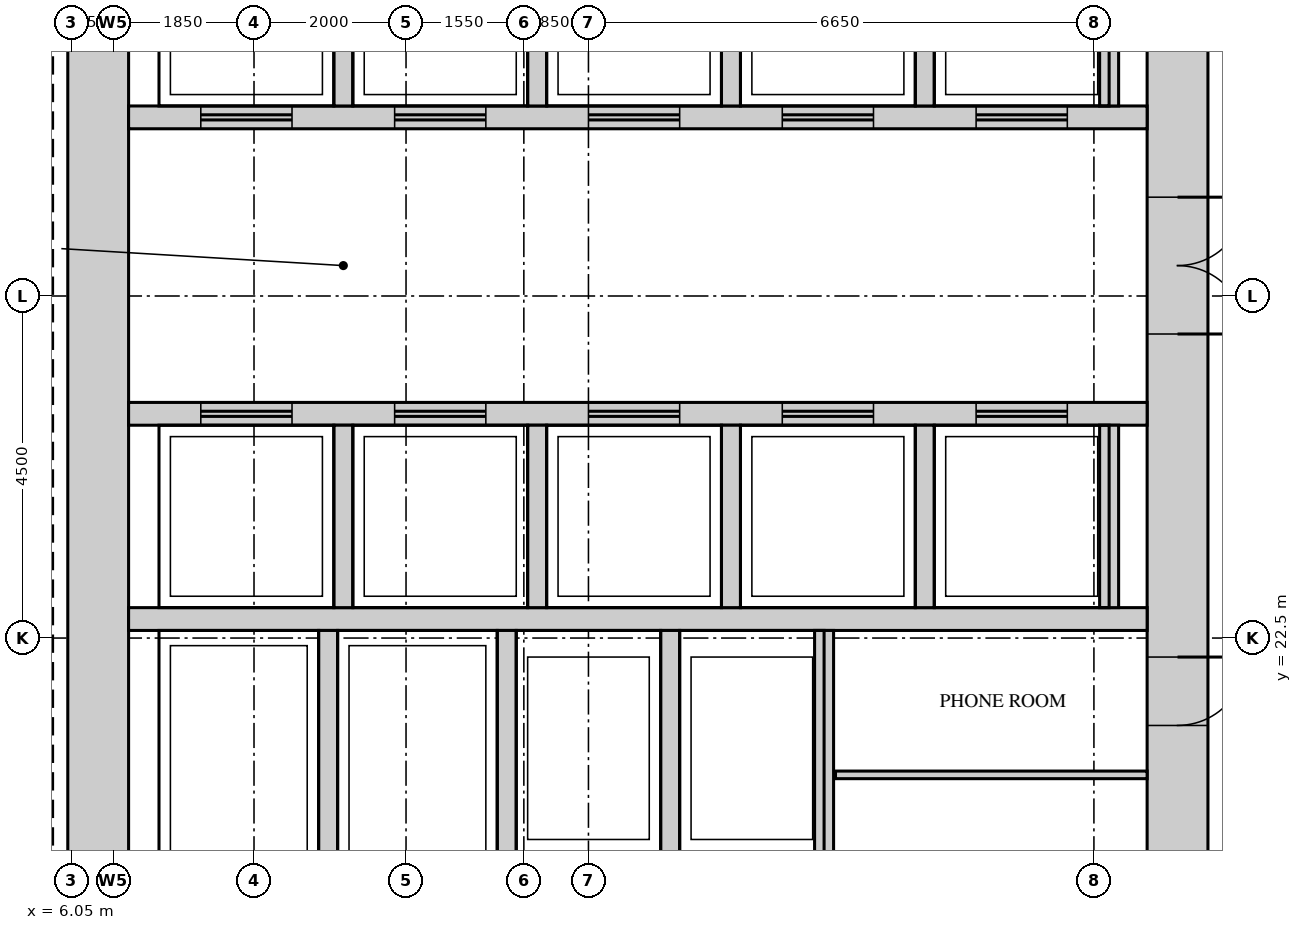
"""IFC4 building model, lengths in metres.
Left out: names, types, materials, properties, quantities, classifications, styles, units other than length and angle.
Written with IfcOpenShell. Run it as: python <this file> out.ifc"""

import sys

from ifc_helpers import new_model, si_unit, direction, frame, frame_2d, origin, place, context, subcontext, project, spatial, rectangle, extrude, source, transform, mapped, element, fill, save


model = new_model("IFC4")
c1 = context("Model", 3, precision=1e-05, world=origin(), true_north=direction((0.0, 1.0)))
c2 = subcontext(c1, "Body", "Model", "MODEL_VIEW")
j1 = project(units=[si_unit("LENGTHUNIT", "METRE"), si_unit("PLANEANGLEUNIT", "RADIAN")], contexts=[c1])
p1 = place(None, origin())
s1 = spatial("IfcSite", under=j1, at=p1, CompositionType="ELEMENT")
p2 = place(p1, origin())
s2 = spatial("IfcBuilding", under=s1, at=p2, CompositionType="ELEMENT")
p3 = place(p2, frame((0.0, 0.0, 172.7)))
s3 = spatial("IfcBuildingStorey", under=s2, at=p3, CompositionType="ELEMENT", Elevation=172.7)
m1 = source(origin(), c2, "Body", "SweptSolid", [
    extrude(rectangle(XDim=22.4, YDim=0.8, at=frame_2d((11.2, 0.0))), origin(), (0.0, 0.0, 1.0), 3.75),
])
p4 = place(p3, frame((20.6, 15.8, 0.0), z_axis=(0.0, 0.0, 1.0), x_axis=(0.0, 1.0, 0.0)))
e1 = element("IfcWall", 1, at=p4, inside=s3, PredefinedType="SHEAR", context=c2, shape_type="MappedRepresentation", body=[
    mapped(m1, transform((0.0, 0.0, 0.0))),
])
m2 = source(origin(), c2, "Body", "SweptSolid", [
    extrude(rectangle(XDim=1.8, YDim=2.1, at=frame_2d((0.9, 1.05))), frame((0.0, 0.41, 0.0), z_axis=(0.0, -1.0, 0.0), x_axis=(1.0, 0.0, 0.0)), (0.0, 0.0, 1.0), 0.82),
])
p5 = place(p4, frame((10.7, 0.0, 0.0)))
e2 = element("IfcOpeningElement", 2, at=p5, cuts=e1, PredefinedType="OPENING", context=c2, shape_type="MappedRepresentation", body=[
    mapped(m2, transform((0.0, 0.0, 0.0))),
])
m3 = source(origin(), c2, "Body", "SweptSolid", [
    extrude(rectangle(XDim=0.9, YDim=2.1, at=frame_2d((0.45, 1.05))), frame((0.0, 0.41, 0.0), z_axis=(0.0, -1.0, 0.0), x_axis=(1.0, 0.0, 0.0)), (0.0, 0.0, 1.0), 0.82),
])
p6 = place(p4, frame((0.35, 0.0, 0.0)))
e3 = element("IfcOpeningElement", 3, at=p6, cuts=e1, PredefinedType="OPENING", context=c2, shape_type="MappedRepresentation", body=[
    mapped(m3, transform((0.0, 0.0, 0.0))),
])
p7 = place(p4, frame((2.8, 0.0, 0.0)))
e4 = element("IfcOpeningElement", 4, at=p7, cuts=e1, PredefinedType="OPENING", context=c2, shape_type="MappedRepresentation", body=[
    mapped(m3, transform((0.0, 0.0, 0.0))),
])
p8 = place(p4, frame((5.55, 0.0, 0.0)))
e5 = element("IfcOpeningElement", 5, at=p8, cuts=e1, PredefinedType="OPENING", context=c2, shape_type="MappedRepresentation", body=[
    mapped(m3, transform((0.0, 0.0, 0.0))),
])
p9 = place(p3, frame((6.4, 15.8, 0.0), z_axis=(0.0, 0.0, 1.0), x_axis=(0.0, 1.0, 0.0)))
e6 = element("IfcWall", 6, at=p9, inside=s3, PredefinedType="SHEAR", context=c2, shape_type="MappedRepresentation", body=[
    mapped(m1, transform((0.0, 0.0, 0.0))),
])
m4 = source(origin(), c2, "Body", "SweptSolid", [
    extrude(rectangle(XDim=13.4, YDim=0.3, at=frame_2d((6.7, 0.0))), origin(), (0.0, 0.0, 1.0), 3.75),
])
p10 = place(p3, frame((6.8, 22.75, 0.0), z_axis=(0.0, 0.0, 1.0), x_axis=(1.0, 0.0, 0.0)))
e7 = element("IfcWall", 7, at=p10, inside=s3, PredefinedType="STANDARD", context=c2, shape_type="MappedRepresentation", body=[
    mapped(m4, transform((0.0, 0.0, 0.0))),
])
p11 = place(p3, frame((6.8, 29.35, 0.0), z_axis=(0.0, 0.0, 1.0), x_axis=(1.0, 0.0, 0.0)))
e8 = element("IfcWall", 8, at=p11, inside=s3, PredefinedType="STANDARD", context=c2, shape_type="MappedRepresentation", body=[
    mapped(m4, transform((0.0, 0.0, 0.0))),
])
m5 = source(origin(), c2, "Body", "SweptSolid", [
    extrude(rectangle(XDim=1.2, YDim=2.1, at=frame_2d((0.6, 1.05))), frame((0.0, 0.16, 0.0), z_axis=(0.0, -1.0, 0.0), x_axis=(1.0, 0.0, 0.0)), (0.0, 0.0, 1.0), 0.32),
])
p12 = place(p11, frame((0.95, 0.0, 0.0)))
e9 = element("IfcOpeningElement", 9, at=p12, cuts=e8, PredefinedType="OPENING", context=c2, shape_type="MappedRepresentation", body=[
    mapped(m5, transform((0.0, 0.0, 0.0))),
])
p13 = place(p11, frame((3.5, 0.0, 0.0)))
e10 = element("IfcOpeningElement", 10, at=p13, cuts=e8, PredefinedType="OPENING", context=c2, shape_type="MappedRepresentation", body=[
    mapped(m5, transform((0.0, 0.0, 0.0))),
])
p14 = place(p11, frame((6.05, 0.0, 0.0)))
e11 = element("IfcOpeningElement", 11, at=p14, cuts=e8, PredefinedType="OPENING", context=c2, shape_type="MappedRepresentation", body=[
    mapped(m5, transform((0.0, 0.0, 0.0))),
])
p15 = place(p11, frame((8.6, 0.0, 0.0)))
e12 = element("IfcOpeningElement", 12, at=p15, cuts=e8, PredefinedType="OPENING", context=c2, shape_type="MappedRepresentation", body=[
    mapped(m5, transform((0.0, 0.0, 0.0))),
])
p16 = place(p11, frame((11.15, 0.0, 0.0)))
e13 = element("IfcOpeningElement", 13, at=p16, cuts=e8, PredefinedType="OPENING", context=c2, shape_type="MappedRepresentation", body=[
    mapped(m5, transform((0.0, 0.0, 0.0))),
])
p17 = place(p3, frame((6.8, 25.45, 0.0), z_axis=(0.0, 0.0, 1.0), x_axis=(1.0, 0.0, 0.0)))
e14 = element("IfcWall", 14, at=p17, inside=s3, PredefinedType="STANDARD", context=c2, shape_type="MappedRepresentation", body=[
    mapped(m4, transform((0.0, 0.0, 0.0))),
])
p18 = place(p17, frame((0.95, 0.0, 0.0)))
e15 = element("IfcOpeningElement", 15, at=p18, cuts=e14, PredefinedType="OPENING", context=c2, shape_type="MappedRepresentation", body=[
    mapped(m5, transform((0.0, 0.0, 0.0))),
])
p19 = place(p17, frame((3.5, 0.0, 0.0)))
e16 = element("IfcOpeningElement", 16, at=p19, cuts=e14, PredefinedType="OPENING", context=c2, shape_type="MappedRepresentation", body=[
    mapped(m5, transform((0.0, 0.0, 0.0))),
])
p20 = place(p17, frame((6.05, 0.0, 0.0)))
e17 = element("IfcOpeningElement", 17, at=p20, cuts=e14, PredefinedType="OPENING", context=c2, shape_type="MappedRepresentation", body=[
    mapped(m5, transform((0.0, 0.0, 0.0))),
])
p21 = place(p17, frame((8.6, 0.0, 0.0)))
e18 = element("IfcOpeningElement", 18, at=p21, cuts=e14, PredefinedType="OPENING", context=c2, shape_type="MappedRepresentation", body=[
    mapped(m5, transform((0.0, 0.0, 0.0))),
])
p22 = place(p17, frame((11.15, 0.0, 0.0)))
e19 = element("IfcOpeningElement", 19, at=p22, cuts=e14, PredefinedType="OPENING", context=c2, shape_type="MappedRepresentation", body=[
    mapped(m5, transform((0.0, 0.0, 0.0))),
])
m6 = source(origin(), c2, "Body", "SweptSolid", [
    extrude(rectangle(XDim=3.1, YDim=0.25, at=frame_2d((1.55, 0.0))), origin(), (0.0, 0.0, 1.0), 3.75),
])
for number, where, z_axis, x_axis in (
    (20, (9.425, 19.5, 0.0), (0.0, 0.0, 1.0), (0.0, 1.0, 0.0)),
    (21, (11.775, 19.5, 0.0), (0.0, 0.0, 1.0), (0.0, 1.0, 0.0)),
    (22, (13.925, 19.5, 0.0), (0.0, 0.0, 1.0), (0.0, 1.0, 0.0)),
    (23, (15.95, 19.5, 0.0), (0.0, 0.0, 1.0), (0.0, 1.0, 0.0)),
):
    element("IfcWall", number, at=place(p3, frame(where, z_axis=z_axis, x_axis=x_axis)), inside=s3, PredefinedType="STANDARD", context=c2, shape_type="MappedRepresentation", body=[
        mapped(m6, transform((0.0, 0.0, 0.0))),
    ])
m7 = source(origin(), c2, "Body", "SweptSolid", [
    extrude(rectangle(XDim=2.4, YDim=0.25, at=frame_2d((1.2, 0.0))), origin(), (0.0, 0.0, 1.0), 3.75),
])
for number, where, z_axis, x_axis in (
    (24, (17.275, 29.5, 0.0), (0.0, 0.0, 1.0), (0.0, 1.0, 0.0)),
    (25, (19.7, 29.5, 0.0), (0.0, 0.0, 1.0), (0.0, 1.0, 0.0)),
    (26, (9.625, 29.5, 0.0), (0.0, 0.0, 1.0), (0.0, 1.0, 0.0)),
    (27, (12.175, 29.5, 0.0), (0.0, 0.0, 1.0), (0.0, 1.0, 0.0)),
    (28, (14.725, 29.5, 0.0), (0.0, 0.0, 1.0), (0.0, 1.0, 0.0)),
):
    element("IfcWall", number, at=place(p3, frame(where, z_axis=z_axis, x_axis=x_axis)), inside=s3, PredefinedType="STANDARD", context=c2, shape_type="MappedRepresentation", body=[
        mapped(m7, transform((0.0, 0.0, 0.0))),
    ])
m8 = source(origin(), c2, "Body", "SweptSolid", [
    extrude(rectangle(XDim=2.4, YDim=0.25, at=frame_2d((1.2, 0.0))), origin(), (0.0, 0.0, 1.0), 3.75),
])
for number, where, z_axis, x_axis in (
    (29, (17.275, 22.9, 0.0), (0.0, 0.0, 1.0), (0.0, 1.0, 0.0)),
    (30, (19.7, 22.9, 0.0), (0.0, 0.0, 1.0), (0.0, 1.0, 0.0)),
    (31, (9.625, 22.9, 0.0), (0.0, 0.0, 1.0), (0.0, 1.0, 0.0)),
    (32, (12.175, 22.9, 0.0), (0.0, 0.0, 1.0), (0.0, 1.0, 0.0)),
    (33, (14.725, 22.9, 0.0), (0.0, 0.0, 1.0), (0.0, 1.0, 0.0)),
):
    element("IfcWall", number, at=place(p3, frame(where, z_axis=z_axis, x_axis=x_axis)), inside=s3, PredefinedType="STANDARD", context=c2, shape_type="MappedRepresentation", body=[
        mapped(m8, transform((0.0, 0.0, 0.0))),
    ])
m9 = source(origin(), c2, "Body", "SweptSolid", [
    extrude(rectangle(XDim=4.1, YDim=0.1, at=frame_2d((2.05, 0.0))), origin(), (0.0, 0.0, 1.0), 3.8),
])
p23 = place(p3, frame((16.1, 20.7, 0.0), z_axis=(0.0, 0.0, 1.0), x_axis=(1.0, 0.0, 0.0)))
e34 = element("IfcWall", 34, at=p23, inside=s3, PredefinedType="PARTITIONING", context=c2, shape_type="MappedRepresentation", body=[
    mapped(m9, transform((0.0, 0.0, 0.0))),
])
m10 = source(origin(), c2, "Body", "SweptSolid", [
    extrude(rectangle(XDim=1.8, YDim=2.1, at=frame_2d((0.9, 1.05))), frame((0.0, 0.35, 0.0), z_axis=(0.0, -1.0, 0.0), x_axis=(1.0, 0.0, 0.0)), (0.0, 0.0, 1.0), 0.7),
])
p24 = place(p5, origin())
e35 = element("IfcDoor", 35, at=p24, inside=s3, OperationType="DOUBLE_DOOR_SINGLE_SWING", PredefinedType="DOOR", context=c2, shape_type="MappedRepresentation", body=[
    mapped(m10, transform((0.0, 0.0, 0.0))),
])
fill(e2, e35)
m11 = source(origin(), c2, "Body", "SweptSolid", [
    extrude(rectangle(XDim=0.9, YDim=2.1, at=frame_2d((0.45, 1.05))), frame((0.0, 0.35, 0.0), z_axis=(0.0, -1.0, 0.0), x_axis=(1.0, 0.0, 0.0)), (0.0, 0.0, 1.0), 0.7),
])
p25 = place(p8, origin())
e36 = element("IfcDoor", 36, at=p25, inside=s3, OperationType="SINGLE_SWING_RIGHT", PredefinedType="DOOR", context=c2, shape_type="MappedRepresentation", body=[
    mapped(m11, transform((0.0, 0.0, 0.0))),
])
fill(e5, e36)
m12 = source(origin(), c2, "Body", "SweptSolid", [
    extrude(rectangle(XDim=1.2, YDim=2.1, at=frame_2d((0.6, 1.05))), frame((0.0, 0.025, 0.0), z_axis=(0.0, -1.0, 0.0), x_axis=(1.0, 0.0, 0.0)), (0.0, 0.0, 1.0), 0.05),
])
p26 = place(p18, origin())
e37 = element("IfcDoor", 37, at=p26, inside=s3, OperationType="DOUBLE_DOOR_SLIDING", PredefinedType="DOOR", context=c2, shape_type="MappedRepresentation", body=[
    mapped(m12, transform((0.0, 0.0, 0.0))),
])
fill(e15, e37)
p27 = place(p19, origin())
e38 = element("IfcDoor", 38, at=p27, inside=s3, OperationType="DOUBLE_DOOR_SLIDING", PredefinedType="DOOR", context=c2, shape_type="MappedRepresentation", body=[
    mapped(m12, transform((0.0, 0.0, 0.0))),
])
fill(e16, e38)
p28 = place(p20, origin())
e39 = element("IfcDoor", 39, at=p28, inside=s3, OperationType="DOUBLE_DOOR_SLIDING", PredefinedType="DOOR", context=c2, shape_type="MappedRepresentation", body=[
    mapped(m12, transform((0.0, 0.0, 0.0))),
])
fill(e17, e39)
p29 = place(p21, origin())
e40 = element("IfcDoor", 40, at=p29, inside=s3, OperationType="DOUBLE_DOOR_SLIDING", PredefinedType="DOOR", context=c2, shape_type="MappedRepresentation", body=[
    mapped(m12, transform((0.0, 0.0, 0.0))),
])
fill(e18, e40)
p30 = place(p22, origin())
e41 = element("IfcDoor", 41, at=p30, inside=s3, OperationType="DOUBLE_DOOR_SLIDING", PredefinedType="DOOR", context=c2, shape_type="MappedRepresentation", body=[
    mapped(m12, transform((0.0, 0.0, 0.0))),
])
fill(e19, e41)
p31 = place(p12, origin())
e42 = element("IfcDoor", 42, at=p31, inside=s3, OperationType="DOUBLE_DOOR_SLIDING", PredefinedType="DOOR", context=c2, shape_type="MappedRepresentation", body=[
    mapped(m12, transform((0.0, 0.0, 0.0))),
])
fill(e9, e42)
p32 = place(p13, origin())
e43 = element("IfcDoor", 43, at=p32, inside=s3, OperationType="DOUBLE_DOOR_SLIDING", PredefinedType="DOOR", context=c2, shape_type="MappedRepresentation", body=[
    mapped(m12, transform((0.0, 0.0, 0.0))),
])
fill(e10, e43)
p33 = place(p14, origin())
e44 = element("IfcDoor", 44, at=p33, inside=s3, OperationType="DOUBLE_DOOR_SLIDING", PredefinedType="DOOR", context=c2, shape_type="MappedRepresentation", body=[
    mapped(m12, transform((0.0, 0.0, 0.0))),
])
fill(e11, e44)
p34 = place(p15, origin())
e45 = element("IfcDoor", 45, at=p34, inside=s3, OperationType="DOUBLE_DOOR_SLIDING", PredefinedType="DOOR", context=c2, shape_type="MappedRepresentation", body=[
    mapped(m12, transform((0.0, 0.0, 0.0))),
])
fill(e12, e45)
p35 = place(p16, origin())
e46 = element("IfcDoor", 46, at=p35, inside=s3, OperationType="DOUBLE_DOOR_SLIDING", PredefinedType="DOOR", context=c2, shape_type="MappedRepresentation", body=[
    mapped(m12, transform((0.0, 0.0, 0.0))),
])
fill(e13, e46)
save(model, sys.argv[1])
